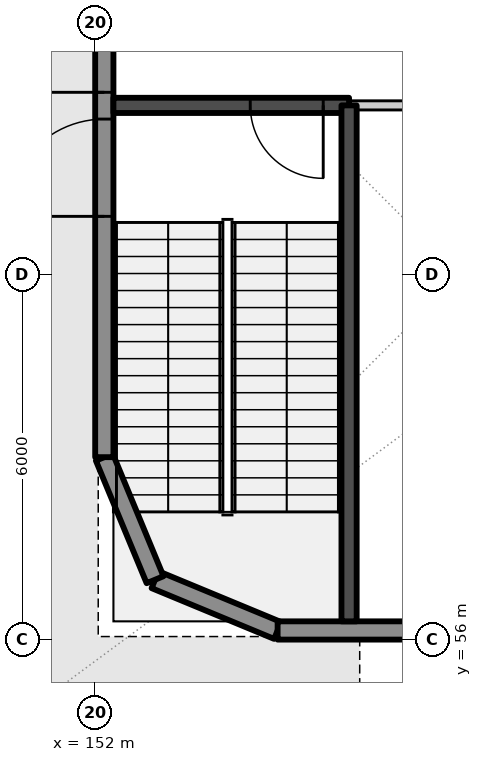
"""IFC4 building model, lengths in metres.
Left out: names, types, materials, properties, quantities, classifications, styles, units other than length and angle.
Written with IfcOpenShell. Run it as: python <this file> out.ifc"""

import sys

from ifc_helpers import new_model, si_unit, direction, frame, frame_2d, origin, place, context, subcontext, project, spatial, rectangle, extrude, element, fill, save


model = new_model("IFC4")
c1 = context("Model", 3, precision=1e-05, world=origin(), true_north=direction((0.0, 1.0)))
c2 = subcontext(c1, "Body", "Model", "MODEL_VIEW")
j1 = project(units=[si_unit("LENGTHUNIT", "METRE"), si_unit("PLANEANGLEUNIT", "RADIAN")], contexts=[c1])
p1 = place(None, origin())
s1 = spatial("IfcSite", under=j1, at=p1, CompositionType="ELEMENT")
p2 = place(p1, origin())
s2 = spatial("IfcBuilding", under=s1, at=p2, CompositionType="ELEMENT")
p3 = place(p2, origin())
s3 = spatial("IfcBuildingStorey", under=s2, at=p3, CompositionType="ELEMENT", Elevation=0.0)
for number, where, z_axis, x_axis in (
    (1, (155.0, 56.15, 0.0), (0.0, 0.0, 1.0), (-0.924, 0.383, 0.0)),
    (2, (152.985, 56.985, 0.0), (0.0, 0.0, 1.0), (-0.383, 0.924, 0.0)),
):
    element("IfcWall", number, at=place(p3, frame(where, z_axis=z_axis, x_axis=x_axis)), inside=s3, PredefinedType="SOLIDWALL", context=c2, shape_type="SweptSolid", body=[
        extrude(rectangle(XDim=2.181, YDim=0.3, at=frame_2d((1.091, 0.0))), origin(), (0.0, 0.0, 1.0), 6.6),
    ])
p4 = place(p3, frame((152.15, 59.0, 0.0), z_axis=(0.0, 0.0, 1.0), x_axis=(0.0, 1.0, 0.0)))
e3 = element("IfcWall", 3, at=p4, inside=s3, PredefinedType="SOLIDWALL", context=c2, shape_type="SweptSolid", body=[
    extrude(rectangle(XDim=8.7, YDim=0.3, at=frame_2d((4.35, 0.0))), origin(), (0.0, 0.0, 1.0), 6.6),
])
p5 = place(p4, frame((3.96, 0.0, 0.0)))
e4 = element("IfcOpeningElement", 4, at=p5, cuts=e3, PredefinedType="OPENING", context=c2, shape_type="SweptSolid", body=[
    extrude(rectangle(XDim=1.6, YDim=2.4, at=frame_2d((0.8, 1.2))), frame((0.0, 0.16, 0.0), z_axis=(0.0, -1.0, 0.0), x_axis=(1.0, 0.0, 0.0)), (0.0, 0.0, 1.0), 0.32),
])
p6 = place(p4, frame((6.0, 0.0, 0.0)))
e5 = element("IfcOpeningElement", 5, at=p6, cuts=e3, PredefinedType="OPENING", context=c2, shape_type="SweptSolid", body=[
    extrude(rectangle(XDim=2.4, YDim=2.5, at=frame_2d((1.2, 1.25))), frame((0.0, 0.16, 0.0), z_axis=(0.0, -1.0, 0.0), x_axis=(1.0, 0.0, 0.0)), (0.0, 0.0, 1.0), 0.32),
])
p7 = place(p3, frame((157.7, 56.15, 0.0), z_axis=(0.0, 0.0, 1.0), x_axis=(-1.0, 0.0, 0.0)))
e6 = element("IfcWall", 6, at=p7, inside=s3, PredefinedType="SOLIDWALL", context=c2, shape_type="SweptSolid", body=[
    extrude(rectangle(XDim=2.7, YDim=0.3, at=frame_2d((1.35, 0.0))), origin(), (0.0, 0.0, 1.0), 6.6),
])
p8 = place(p3, frame((156.175, 64.785, 0.0), z_axis=(0.0, 0.0, 1.0), x_axis=(-1.0, 0.0, 0.0)))
e7 = element("IfcWall", 7, at=p8, inside=s3, PredefinedType="SOLIDWALL", context=c2, shape_type="SweptSolid", body=[
    extrude(rectangle(XDim=3.875, YDim=0.25, at=frame_2d((1.938, 0.0))), origin(), (0.0, 0.0, 1.0), 6.6),
])
p9 = place(p8, frame((0.425, 0.0, 0.0)))
e8 = element("IfcOpeningElement", 8, at=p9, cuts=e7, PredefinedType="OPENING", context=c2, shape_type="SweptSolid", body=[
    extrude(rectangle(XDim=1.2, YDim=2.1, at=frame_2d((0.6, 1.05))), frame((0.0, 0.135, 0.0), z_axis=(0.0, -1.0, 0.0), x_axis=(1.0, 0.0, 0.0)), (0.0, 0.0, 1.0), 0.27),
])
p10 = place(p3, frame((156.175, 64.785, 0.0), z_axis=(0.0, 0.0, 1.0), x_axis=(0.0, -1.0, 0.0)))
e9 = element("IfcWall", 9, at=p10, inside=s3, PredefinedType="SOLIDWALL", context=c2, shape_type="SweptSolid", body=[
    extrude(rectangle(XDim=8.485, YDim=0.25, at=frame_2d((4.242, 0.0))), origin(), (0.0, 0.0, 1.0), 6.6),
])
p11 = place(p3, frame((164.0, 64.785, 0.0), z_axis=(0.0, 0.0, 1.0), x_axis=(-1.0, 0.0, 0.0)))
e10 = element("IfcWall", 10, at=p11, inside=s3, PredefinedType="PARTITIONING", context=c2, shape_type="SweptSolid", body=[
    extrude(rectangle(XDim=7.825, YDim=0.15, at=frame_2d((3.913, 0.0))), origin(), (0.0, 0.0, 1.0), 6.25),
])
p12 = place(p11, frame((3.325, 0.0, 0.0)))
e11 = element("IfcOpeningElement", 11, at=p12, cuts=e10, PredefinedType="OPENING", context=c2, shape_type="SweptSolid", body=[
    extrude(rectangle(XDim=1.0, YDim=2.1, at=frame_2d((0.5, 1.05))), frame((0.0, 0.085, 0.0), z_axis=(0.0, -1.0, 0.0), x_axis=(1.0, 0.0, 0.0)), (0.0, 0.0, 1.0), 0.17),
])
p13 = place(p5, origin())
e12 = element("IfcDoor", 12, at=p13, inside=s3, OperationType="SINGLE_SWING_LEFT", PredefinedType="DOOR", context=c2, shape_type="SweptSolid", body=[
    extrude(rectangle(XDim=1.6, YDim=2.4, at=frame_2d((0.8, 1.2))), frame((0.0, 0.025, 0.0), z_axis=(0.0, -1.0, 0.0), x_axis=(1.0, 0.0, 0.0)), (0.0, 0.0, 1.0), 0.05),
])
fill(e4, e12)
p14 = place(p6, origin())
e13 = element("IfcDoor", 13, at=p14, inside=s3, OperationType="SINGLE_SWING_LEFT", PredefinedType="DOOR", context=c2, shape_type="SweptSolid", body=[
    extrude(rectangle(XDim=2.4, YDim=2.5, at=frame_2d((1.2, 1.25))), frame((0.0, 0.025, 0.0), z_axis=(0.0, -1.0, 0.0), x_axis=(1.0, 0.0, 0.0)), (0.0, 0.0, 1.0), 0.05),
])
fill(e5, e13)
p15 = place(p9, origin())
e14 = element("IfcDoor", 14, at=p15, inside=s3, OperationType="SINGLE_SWING_LEFT", PredefinedType="DOOR", context=c2, shape_type="SweptSolid", body=[
    extrude(rectangle(XDim=1.2, YDim=2.1, at=frame_2d((0.6, 1.05))), frame((0.0, 0.025, 0.0), z_axis=(0.0, -1.0, 0.0), x_axis=(1.0, 0.0, 0.0)), (0.0, 0.0, 1.0), 0.05),
])
fill(e8, e14)
save(model, sys.argv[1])
